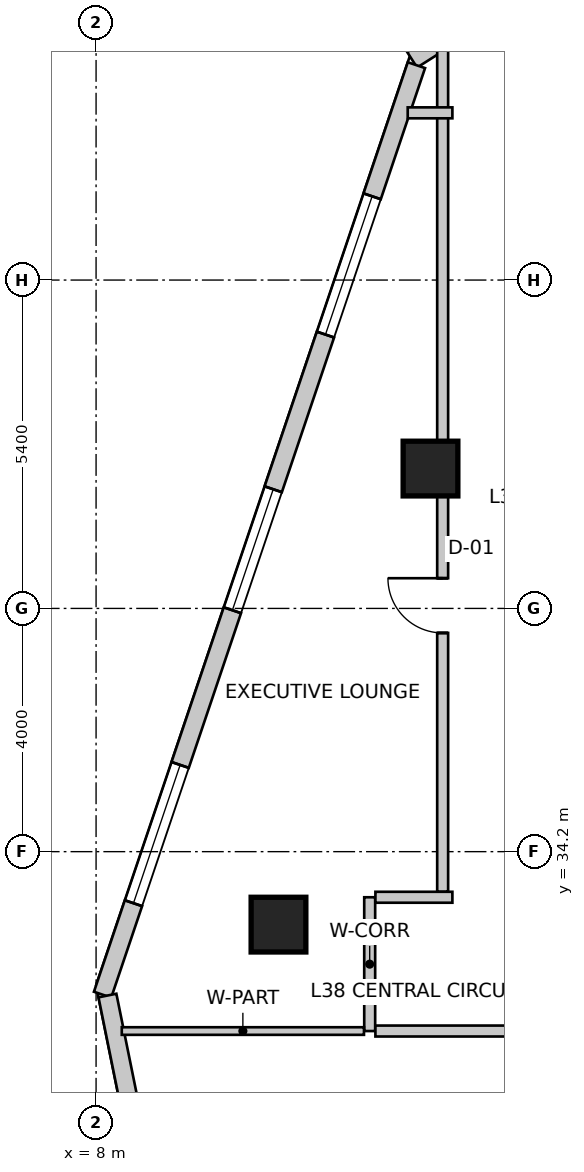
"""IFC4 building model, lengths in metres.
Left out: names, types, materials, properties, quantities, classifications, styles, units other than length and angle.
Written with IfcOpenShell. Run it as: python <this file> out.ifc"""

import sys

from ifc_helpers import new_model, si_unit, direction, frame, frame_2d, origin, origin_2d, place, context, subcontext, project, spatial, rectangle, extrude, source, transform, mapped, element, fill, save


model = new_model("IFC4")
c1 = context("Model", 3, precision=1e-05, world=origin(), true_north=direction((0.0, 1.0)))
c2 = subcontext(c1, "Body", "Model", "MODEL_VIEW")
j1 = project(units=[si_unit("LENGTHUNIT", "METRE"), si_unit("PLANEANGLEUNIT", "RADIAN")], contexts=[c1])
p1 = place(None, origin())
s1 = spatial("IfcSite", under=j1, at=p1, CompositionType="ELEMENT")
p2 = place(p1, origin())
s2 = spatial("IfcBuilding", under=s1, at=p2, CompositionType="ELEMENT")
p3 = place(p2, frame((0.0, 0.0, 153.8)))
s3 = spatial("IfcBuildingStorey", under=s2, at=p3, CompositionType="ELEMENT", Elevation=153.8)
m1 = source(origin(), c2, "Body", "SweptSolid", [
    extrude(rectangle(XDim=0.9, YDim=0.9, at=origin_2d()), origin(), (0.0, 0.0, 1.0), 3.6),
])
for number, where, z_axis, x_axis in (
    (1, (11.0, 33.0, 0.0), (0.0, 0.0, 1.0), (1.0, 0.0, 0.0)),
    (2, (13.5, 40.5, 0.0), (0.0, 0.0, 1.0), (1.0, 0.0, 0.0)),
):
    element("IfcColumn", number, at=place(p3, frame(where, z_axis=z_axis, x_axis=x_axis)), inside=s3, PredefinedType="COLUMN", context=c2, shape_type="MappedRepresentation", body=[
        mapped(m1, transform((0.0, 0.0, 0.0), scale=1.0)),
    ])
p4 = place(p3, frame((21.875, 52.742, 0.0), z_axis=(0.0, 0.0, 1.0), x_axis=(-0.843662465249, -0.536873956092, 0.0)))
e3 = element("IfcWall", 3, at=p4, inside=s3, PredefinedType="SOLIDWALL", context=c2, shape_type="SweptSolid", body=[
    extrude(rectangle(XDim=10.284, YDim=0.3, at=frame_2d((5.142, 0.0))), origin(), (0.0, 0.0, 1.0), 3.35),
])
m2 = source(origin(), c2, "Body", "SweptSolid", [
    extrude(rectangle(XDim=2.1, YDim=2.0, at=frame_2d((1.05, 1.0))), frame((0.0, 0.16, 0.0), z_axis=(0.0, -1.0, 0.0), x_axis=(1.0, 0.0, 0.0)), (0.0, 0.0, 1.0), 0.32),
])
p5 = place(p4, frame((2.806, 0.0, 0.85)))
e4 = element("IfcOpeningElement", 4, at=p5, cuts=e3, PredefinedType="OPENING", context=c2, shape_type="MappedRepresentation", body=[
    mapped(m2, transform((0.0, 0.0, 0.0), scale=1.0)),
])
m3 = source(origin(), c2, "Body", "SweptSolid", [
    extrude(rectangle(XDim=1.2, YDim=1.6, at=frame_2d((0.6, 0.8))), frame((0.0, 0.16, 0.0), z_axis=(0.0, -1.0, 0.0), x_axis=(1.0, 0.0, 0.0)), (0.0, 0.0, 1.0), 0.32),
])
p6 = place(p4, frame((8.087, 0.0, 0.85)))
e5 = element("IfcOpeningElement", 5, at=p6, cuts=e3, PredefinedType="OPENING", context=c2, shape_type="MappedRepresentation", body=[
    mapped(m3, transform((0.0, 0.0, 0.0), scale=1.0)),
])
p7 = place(p3, frame((13.269, 47.134, 0.0), z_axis=(0.0, 0.0, 1.0), x_axis=(-0.319929773322, -0.947441259468, 0.0)))
e6 = element("IfcWall", 6, at=p7, inside=s3, PredefinedType="SOLIDWALL", context=c2, shape_type="SweptSolid", body=[
    extrude(rectangle(XDim=16.134, YDim=0.3, at=frame_2d((8.067, 0.0))), origin(), (0.0, 0.0, 1.0), 3.35),
])
m4 = source(origin(), c2, "Body", "SweptSolid", [
    extrude(rectangle(XDim=2.4, YDim=2.2, at=frame_2d((1.2, 1.1))), frame((0.0, 0.16, 0.0), z_axis=(0.0, -1.0, 0.0), x_axis=(1.0, 0.0, 0.0)), (0.0, 0.0, 1.0), 0.32),
])
p8 = place(p7, frame((2.276, 0.0, 0.85)))
e7 = element("IfcOpeningElement", 7, at=p8, cuts=e6, PredefinedType="OPENING", context=c2, shape_type="MappedRepresentation", body=[
    mapped(m4, transform((0.0, 0.0, 0.0), scale=1.0)),
])
p9 = place(p7, frame((7.361, 0.0, 0.85)))
e8 = element("IfcOpeningElement", 8, at=p9, cuts=e6, PredefinedType="OPENING", context=c2, shape_type="MappedRepresentation", body=[
    mapped(m2, transform((0.0, 0.0, 0.0), scale=1.0)),
])
p10 = place(p7, frame((12.146, 0.0, 0.85)))
e9 = element("IfcOpeningElement", 9, at=p10, cuts=e6, PredefinedType="OPENING", context=c2, shape_type="MappedRepresentation", body=[
    mapped(m4, transform((0.0, 0.0, 0.0), scale=1.0)),
])
p11 = place(p3, frame((8.187, 31.834, 0.0), z_axis=(0.0, 0.0, 1.0), x_axis=(0.198869838988, -0.980025911464, 0.0)))
e10 = element("IfcWall", 10, at=p11, inside=s3, PredefinedType="SOLIDWALL", context=c2, shape_type="SweptSolid", body=[
    extrude(rectangle(XDim=16.363, YDim=0.3, at=frame_2d((8.182, 0.0))), origin(), (0.0, 0.0, 1.0), 3.35),
])
p12 = place(p11, frame((2.676, 0.0, 0.85)))
e11 = element("IfcOpeningElement", 11, at=p12, cuts=e10, PredefinedType="OPENING", context=c2, shape_type="MappedRepresentation", body=[
    mapped(m2, transform((0.0, 0.0, 0.0), scale=1.0)),
])
p13 = place(p11, frame((8.301, 0.0, 0.85)))
e12 = element("IfcOpeningElement", 12, at=p13, cuts=e10, PredefinedType="OPENING", context=c2, shape_type="MappedRepresentation", body=[
    mapped(m4, transform((0.0, 0.0, 0.0), scale=1.0)),
])
p14 = place(p11, frame((13.386, 0.0, 0.85)))
e13 = element("IfcOpeningElement", 13, at=p14, cuts=e10, PredefinedType="OPENING", context=c2, shape_type="MappedRepresentation", body=[
    mapped(m2, transform((0.0, 0.0, 0.0), scale=1.0)),
])
p15 = place(p3, frame((12.5, 31.25, 0.0), z_axis=(0.0, 0.0, 1.0), x_axis=(0.0, 1.0, 0.0)))
e14 = element("IfcWall", 14, at=p15, inside=s3, PredefinedType="PARTITIONING", context=c2, shape_type="SweptSolid", body=[
    extrude(rectangle(XDim=2.2, YDim=0.18, at=frame_2d((1.1, 0.0))), origin(), (0.0, 0.0, 1.0), 3.034),
])
p16 = place(p3, frame((12.594, 33.45, 0.0), z_axis=(0.0, 0.0, 1.0), x_axis=(1.0, 0.0, 0.0)))
e15 = element("IfcWall", 15, at=p16, inside=s3, PredefinedType="PARTITIONING", context=c2, shape_type="SweptSolid", body=[
    extrude(rectangle(XDim=1.266, YDim=0.18, at=frame_2d((0.633, 0.0))), origin(), (0.0, 0.0, 1.0), 3.35),
])
p17 = place(p3, frame((26.76, 31.25, 0.0), z_axis=(0.0, 0.0, 1.0), x_axis=(-1.0, 0.0, 0.0)))
e16 = element("IfcWall", 16, at=p17, inside=s3, PredefinedType="PARTITIONING", context=c2, shape_type="SweptSolid", body=[
    extrude(rectangle(XDim=14.166, YDim=0.18, at=frame_2d((7.083, 0.0))), origin(), (0.0, 0.0, 1.0), 3.034),
])
m5 = source(origin(), c2, "Body", "SweptSolid", [
    extrude(rectangle(XDim=1.4, YDim=2.15, at=frame_2d((0.7, 1.075))), frame((0.0, 0.1, 0.0), z_axis=(0.0, -1.0, 0.0), x_axis=(1.0, 0.0, 0.0)), (0.0, 0.0, 1.0), 0.2),
])
p18 = place(p17, frame((6.323, 0.0, 0.0)))
e17 = element("IfcOpeningElement", 17, at=p18, cuts=e16, PredefinedType="OPENING", context=c2, shape_type="MappedRepresentation", body=[
    mapped(m5, transform((0.0, 0.0, 0.0), scale=1.0)),
])
p19 = place(p3, frame((13.7, 33.544, 0.0), z_axis=(0.0, 0.0, 1.0), x_axis=(0.0, 1.0, 0.0)))
e18 = element("IfcWall", 18, at=p19, inside=s3, PredefinedType="PARTITIONING", context=c2, shape_type="SweptSolid", body=[
    extrude(rectangle(XDim=13.86, YDim=0.18, at=frame_2d((6.93, 0.0))), origin(), (0.0, 0.0, 1.0), 2.492),
])
m6 = source(origin(), c2, "Body", "SweptSolid", [
    extrude(rectangle(XDim=0.9, YDim=2.15, at=frame_2d((0.45, 1.075))), frame((0.0, 0.1, 0.0), z_axis=(0.0, -1.0, 0.0), x_axis=(1.0, 0.0, 0.0)), (0.0, 0.0, 1.0), 0.2),
])
p20 = place(p19, frame((4.253, 0.0, 0.0)))
e19 = element("IfcOpeningElement", 19, at=p20, cuts=e18, PredefinedType="OPENING", context=c2, shape_type="MappedRepresentation", body=[
    mapped(m6, transform((0.0, 0.0, 0.0), scale=1.0)),
])
p21 = place(p3, frame((13.86, 46.35, 0.0), z_axis=(0.0, 0.0, 1.0), x_axis=(-1.0, 0.0, 0.0)))
e20 = element("IfcWall", 20, at=p21, inside=s3, PredefinedType="PARTITIONING", context=c2, shape_type="SweptSolid", body=[
    extrude(rectangle(XDim=0.735, YDim=0.18, at=frame_2d((0.367, 0.0))), origin(), (0.0, 0.0, 1.0), 3.35),
])
p22 = place(p3, frame((12.406, 31.25, 0.0), z_axis=(0.0, 0.0, 1.0), x_axis=(-1.0, 0.0, 0.0)))
e21 = element("IfcWall", 21, at=p22, inside=s3, PredefinedType="PARTITIONING", context=c2, shape_type="SweptSolid", body=[
    extrude(rectangle(XDim=3.983, YDim=0.125, at=frame_2d((1.992, 0.0))), origin(), (0.0, 0.0, 1.0), 2.492),
])
m7 = source(origin(), c2, "Body", "SweptSolid", [
    extrude(rectangle(XDim=2.4, YDim=2.2, at=frame_2d((1.2, 1.1))), frame((0.0, -0.015, 0.0), z_axis=(0.0, -1.0, 0.0), x_axis=(1.0, 0.0, 0.0)), (0.0, 0.0, 1.0), 0.06),
])
p23 = place(p8, origin())
e22 = element("IfcWindow", 22, at=p23, inside=s3, PartitioningType="SINGLE_PANEL", PredefinedType="WINDOW", context=c2, shape_type="MappedRepresentation", body=[
    mapped(m7, transform((0.0, 0.0, 0.0), scale=1.0)),
])
fill(e7, e22)
m8 = source(origin(), c2, "Body", "SweptSolid", [
    extrude(rectangle(XDim=2.1, YDim=2.0, at=frame_2d((1.05, 1.0))), frame((0.0, -0.015, 0.0), z_axis=(0.0, -1.0, 0.0), x_axis=(1.0, 0.0, 0.0)), (0.0, 0.0, 1.0), 0.06),
])
p24 = place(p9, origin())
e23 = element("IfcWindow", 23, at=p24, inside=s3, PartitioningType="SINGLE_PANEL", PredefinedType="WINDOW", context=c2, shape_type="MappedRepresentation", body=[
    mapped(m8, transform((0.0, 0.0, 0.0), scale=1.0)),
])
fill(e8, e23)
p25 = place(p10, origin())
e24 = element("IfcWindow", 24, at=p25, inside=s3, PartitioningType="SINGLE_PANEL", PredefinedType="WINDOW", context=c2, shape_type="MappedRepresentation", body=[
    mapped(m7, transform((0.0, 0.0, 0.0), scale=1.0)),
])
fill(e9, e24)
m9 = source(origin(), c2, "Body", "SweptSolid", [
    extrude(rectangle(XDim=0.9, YDim=2.15, at=frame_2d((0.45, 1.075))), frame((0.0, 0.025, 0.0), z_axis=(0.0, -1.0, 0.0), x_axis=(1.0, 0.0, 0.0)), (0.0, 0.0, 1.0), 0.05),
])
p26 = place(p20, origin())
e25 = element("IfcDoor", 25, at=p26, inside=s3, OperationType="SINGLE_SWING_RIGHT", PredefinedType="DOOR", context=c2, shape_type="MappedRepresentation", body=[
    mapped(m9, transform((0.0, 0.0, 0.0), scale=1.0)),
])
fill(e19, e25)
save(model, sys.argv[1])
